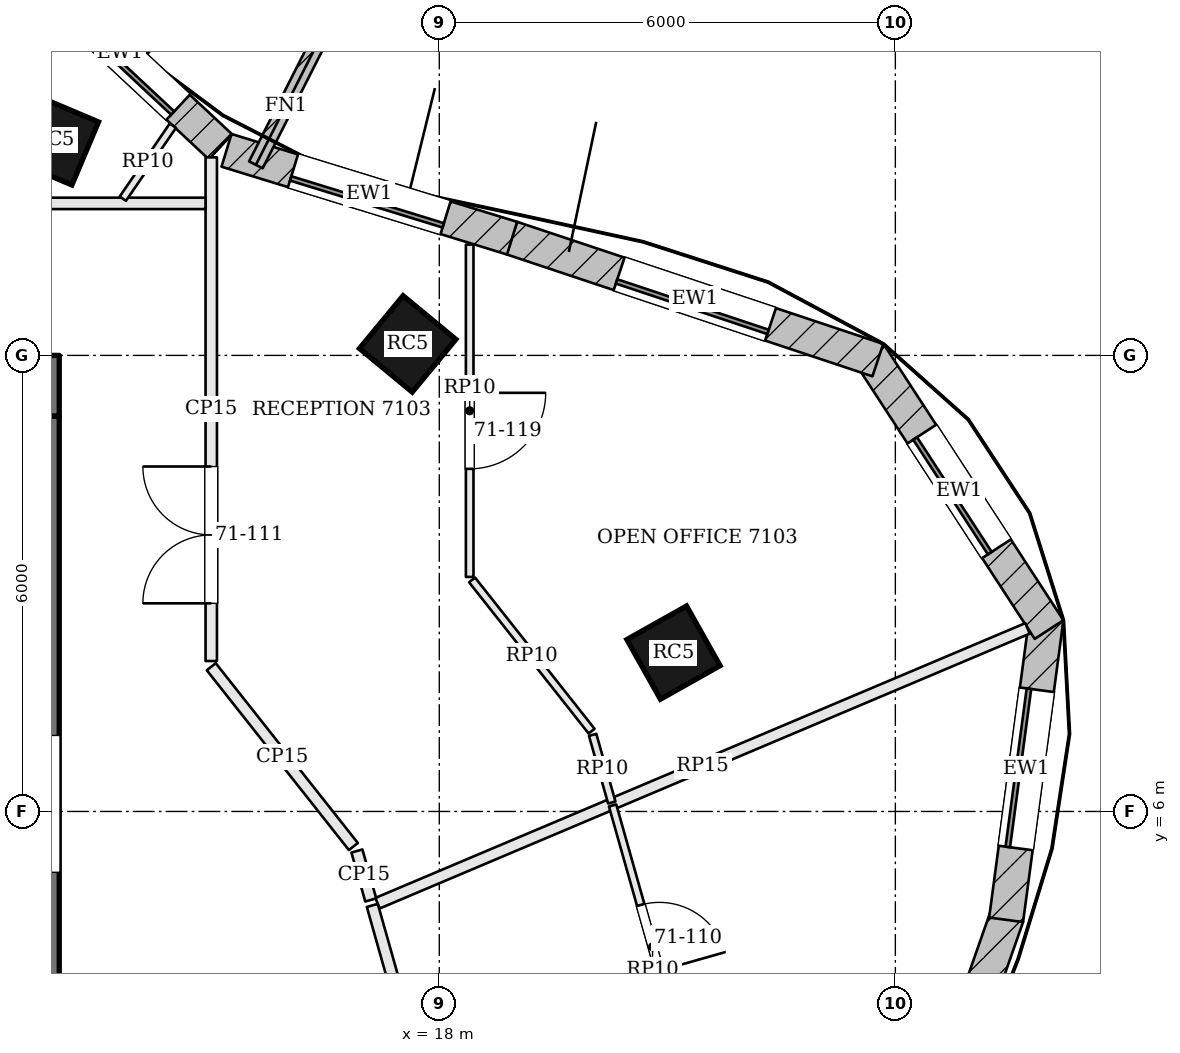
"""IFC4 building model, lengths in metres.
Left out: names, types, materials, properties, quantities, classifications, styles, units other than length and angle.
Written with IfcOpenShell. Run it as: python <this file> out.ifc"""

import sys

from ifc_helpers import new_model, si_unit, direction, frame, frame_2d, origin, origin_2d, place, context, subcontext, project, spatial, rectangle, extrude, element, fill, save


model = new_model("IFC4")
c1 = context("Model", 3, precision=1e-05, world=origin(), true_north=direction((0.0, 1.0)))
c2 = subcontext(c1, "Body", "Model", "MODEL_VIEW")
j1 = project(units=[si_unit("LENGTHUNIT", "METRE"), si_unit("PLANEANGLEUNIT", "RADIAN")], contexts=[c1])
p1 = place(None, origin())
s1 = spatial("IfcSite", under=j1, at=p1, CompositionType="ELEMENT")
p2 = place(p1, origin())
s2 = spatial("IfcBuilding", under=s1, at=p2, CompositionType="ELEMENT")
p3 = place(p2, frame((0.0, 0.0, 288.3)))
s3 = spatial("IfcBuildingStorey", under=s2, at=p3, CompositionType="ELEMENT", Elevation=288.3)
p4 = place(p3, frame((-13.0, 11.6, 0.0), z_axis=(0.0, 0.0, 1.0), x_axis=(1.0, 0.0, 0.0)))
e1 = element("IfcWall", 1, at=p4, inside=s3, PredefinedType="SHEAR", context=c2, shape_type="SweptSolid", body=[
    extrude(rectangle(XDim=26.0, YDim=0.8, at=frame_2d((13.0, 0.0))), origin(), (0.0, 0.0, 1.0), 3.9),
])
p5 = place(p4, frame((9.65, 0.0, 0.0)))
e2 = element("IfcOpeningElement", 2, at=p5, cuts=e1, PredefinedType="OPENING", context=c2, shape_type="SweptSolid", body=[
    extrude(rectangle(XDim=1.0, YDim=2.1, at=frame_2d((0.5, 1.05))), frame((0.0, 0.41, 0.0), z_axis=(0.0, -1.0, 0.0), x_axis=(1.0, 0.0, 0.0)), (0.0, 0.0, 1.0), 0.82),
])
p6 = place(p4, frame((12.675, 0.0, 0.0)))
e3 = element("IfcOpeningElement", 3, at=p6, cuts=e1, PredefinedType="OPENING", context=c2, shape_type="SweptSolid", body=[
    extrude(rectangle(XDim=0.7, YDim=2.1, at=frame_2d((0.35, 1.05))), frame((0.0, 0.41, 0.0), z_axis=(0.0, -1.0, 0.0), x_axis=(1.0, 0.0, 0.0)), (0.0, 0.0, 1.0), 0.82),
])
p7 = place(p4, frame((14.725, 0.0, 0.0)))
e4 = element("IfcOpeningElement", 4, at=p7, cuts=e1, PredefinedType="OPENING", context=c2, shape_type="SweptSolid", body=[
    extrude(rectangle(XDim=0.7, YDim=2.1, at=frame_2d((0.35, 1.05))), frame((0.0, 0.41, 0.0), z_axis=(0.0, -1.0, 0.0), x_axis=(1.0, 0.0, 0.0)), (0.0, 0.0, 1.0), 0.82),
])
p8 = place(p4, frame((16.6, 0.0, 0.0)))
e5 = element("IfcOpeningElement", 5, at=p8, cuts=e1, PredefinedType="OPENING", context=c2, shape_type="SweptSolid", body=[
    extrude(rectangle(XDim=1.0, YDim=2.1, at=frame_2d((0.5, 1.05))), frame((0.0, 0.41, 0.0), z_axis=(0.0, -1.0, 0.0), x_axis=(1.0, 0.0, 0.0)), (0.0, 0.0, 1.0), 0.82),
])
p9 = place(p3, frame((12.6, -2.2, 0.0), z_axis=(0.0, 0.0, 1.0), x_axis=(0.0, 1.0, 0.0)))
e6 = element("IfcWall", 6, at=p9, inside=s3, PredefinedType="SHEAR", context=c2, shape_type="SweptSolid", body=[
    extrude(rectangle(XDim=13.4, YDim=0.8, at=frame_2d((6.7, 0.0))), origin(), (0.0, 0.0, 1.0), 3.9),
])
p10 = place(p9, frame((7.4, 0.0, 0.0)))
e7 = element("IfcOpeningElement", 7, at=p10, cuts=e6, PredefinedType="OPENING", context=c2, shape_type="SweptSolid", body=[
    extrude(rectangle(XDim=1.8, YDim=2.1, at=frame_2d((0.9, 1.05))), frame((0.0, 0.41, 0.0), z_axis=(0.0, -1.0, 0.0), x_axis=(1.0, 0.0, 0.0)), (0.0, 0.0, 1.0), 0.82),
])
for number, where, z_axis, x_axis in (
    (8, (21.081, 8.09, 0.0), (0.0, 0.0, 1.0), (-0.49, 0.872, 0.0)),
    (9, (17.584, 12.151, 0.0), (0.0, 0.0, 1.0), (-0.771, 0.637, 0.0)),
    (10, (12.927, 14.832, 0.0), (0.0, 0.0, 1.0), (-0.921, 0.389, 0.0)),
):
    element("IfcColumn", number, at=place(p3, frame(where, z_axis=z_axis, x_axis=x_axis)), inside=s3, PredefinedType="COLUMN", context=c2, shape_type="SweptSolid", body=[
        extrude(rectangle(XDim=0.9, YDim=0.9, at=origin_2d()), origin(), (0.0, 0.0, 1.0), 3.9),
    ])
p11 = place(p3, frame((23.782, -0.189, 0.0), z_axis=(0.0, 0.0, 1.0), x_axis=(0.330794307703, 0.943702880144, 0.0)))
e11 = element("IfcWall", 11, at=p11, inside=s3, PredefinedType="SOLIDWALL", context=c2, shape_type="SweptSolid", body=[
    extrude(rectangle(XDim=5.095, YDim=0.45, at=frame_2d((2.548, 0.0))), origin(), (0.0, 0.0, 1.0), 3.7),
])
p12 = place(p11, frame((1.498, 0.0, 0.9)))
e12 = element("IfcOpeningElement", 12, at=p12, cuts=e11, PredefinedType="OPENING", context=c2, shape_type="SweptSolid", body=[
    extrude(rectangle(XDim=2.1, YDim=2.3, at=frame_2d((1.05, 1.15))), frame((0.0, 0.235, 0.0), z_axis=(0.0, -1.0, 0.0), x_axis=(1.0, 0.0, 0.0)), (0.0, 0.0, 1.0), 0.47),
])
p13 = place(p3, frame((25.457, 4.575, 0.0), z_axis=(0.0, 0.0, 1.0), x_axis=(0.132475046402, 0.991186340746, 0.0)))
e13 = element("IfcWall", 13, at=p13, inside=s3, PredefinedType="SOLIDWALL", context=c2, shape_type="SweptSolid", body=[
    extrude(rectangle(XDim=4.007, YDim=0.45, at=frame_2d((2.003, 0.0))), origin(), (0.0, 0.0, 1.0), 3.7),
])
p14 = place(p13, frame((0.953, 0.0, 0.9)))
e14 = element("IfcOpeningElement", 14, at=p14, cuts=e13, PredefinedType="OPENING", context=c2, shape_type="SweptSolid", body=[
    extrude(rectangle(XDim=2.1, YDim=2.3, at=frame_2d((1.05, 1.15))), frame((0.0, 0.235, 0.0), z_axis=(0.0, -1.0, 0.0), x_axis=(1.0, 0.0, 0.0)), (0.0, 0.0, 1.0), 0.47),
])
p15 = place(p3, frame((26.022, 8.393, 0.0), z_axis=(0.0, 0.0, 1.0), x_axis=(-0.545637310328, 0.838021435035, 0.0)))
e15 = element("IfcWall", 15, at=p15, inside=s3, PredefinedType="SOLIDWALL", context=c2, shape_type="SweptSolid", body=[
    extrude(rectangle(XDim=4.336, YDim=0.45, at=frame_2d((2.168, 0.0))), origin(), (0.0, 0.0, 1.0), 3.7),
])
p16 = place(p15, frame((1.268, 0.0, 0.9)))
e16 = element("IfcOpeningElement", 16, at=p16, cuts=e15, PredefinedType="OPENING", context=c2, shape_type="SweptSolid", body=[
    extrude(rectangle(XDim=1.8, YDim=2.3, at=frame_2d((0.9, 1.15))), frame((0.0, 0.235, 0.0), z_axis=(0.0, -1.0, 0.0), x_axis=(1.0, 0.0, 0.0)), (0.0, 0.0, 1.0), 0.47),
])
p17 = place(p3, frame((23.77, 11.938, 0.0), z_axis=(0.0, 0.0, 1.0), x_axis=(-0.948673679101, 0.316256621402, 0.0)))
e17 = element("IfcWall", 17, at=p17, inside=s3, PredefinedType="SOLIDWALL", context=c2, shape_type="SweptSolid", body=[
    extrude(rectangle(XDim=5.076, YDim=0.45, at=frame_2d((2.538, 0.0))), origin(), (0.0, 0.0, 1.0), 3.7),
])
p18 = place(p17, frame((1.488, 0.0, 0.9)))
e18 = element("IfcOpeningElement", 18, at=p18, cuts=e17, PredefinedType="OPENING", context=c2, shape_type="SweptSolid", body=[
    extrude(rectangle(XDim=2.1, YDim=2.3, at=frame_2d((1.05, 1.15))), frame((0.0, 0.235, 0.0), z_axis=(0.0, -1.0, 0.0), x_axis=(1.0, 0.0, 0.0)), (0.0, 0.0, 1.0), 0.47),
])
p19 = place(p3, frame((18.958, 13.542, 0.0), z_axis=(0.0, 0.0, 1.0), x_axis=(-0.955792437529, 0.294042201668, 0.0)))
e19 = element("IfcWall", 19, at=p19, inside=s3, PredefinedType="SOLIDWALL", context=c2, shape_type="SweptSolid", body=[
    extrude(rectangle(XDim=3.931, YDim=0.45, at=frame_2d((1.965, 0.0))), origin(), (0.0, 0.0, 1.0), 3.7),
])
p20 = place(p19, frame((0.915, 0.0, 0.9)))
e20 = element("IfcOpeningElement", 20, at=p20, cuts=e19, PredefinedType="OPENING", context=c2, shape_type="SweptSolid", body=[
    extrude(rectangle(XDim=2.1, YDim=2.3, at=frame_2d((1.05, 1.15))), frame((0.0, 0.235, 0.0), z_axis=(0.0, -1.0, 0.0), x_axis=(1.0, 0.0, 0.0)), (0.0, 0.0, 1.0), 0.47),
])
p21 = place(p3, frame((15.121, 14.745, 0.0), z_axis=(0.0, 0.0, 1.0), x_axis=(-0.730618259172, 0.68278617397, 0.0)))
e21 = element("IfcWall", 21, at=p21, inside=s3, PredefinedType="SOLIDWALL", context=c2, shape_type="SweptSolid", body=[
    extrude(rectangle(XDim=3.624, YDim=0.45, at=frame_2d((1.812, 0.0))), origin(), (0.0, 0.0, 1.0), 3.7),
])
p22 = place(p21, frame((0.762, 0.0, 0.9)))
e22 = element("IfcOpeningElement", 22, at=p22, cuts=e21, PredefinedType="OPENING", context=c2, shape_type="SweptSolid", body=[
    extrude(rectangle(XDim=2.1, YDim=2.3, at=frame_2d((1.05, 1.15))), frame((0.0, 0.235, 0.0), z_axis=(0.0, -1.0, 0.0), x_axis=(1.0, 0.0, 0.0)), (0.0, 0.0, 1.0), 0.47),
])
p23 = place(p3, frame((15.587, 14.507, 0.0), z_axis=(0.0, 0.0, 1.0), x_axis=(0.452117231361, 0.89195852432, 0.0)))
e23 = element("IfcWall", 23, at=p23, inside=s3, PredefinedType="SOLIDWALL", context=c2, shape_type="SweptSolid", body=[
    extrude(rectangle(XDim=1.75, YDim=0.2, at=frame_2d((0.875, 0.0))), origin(), (0.0, 0.0, 1.0), 3.7),
])
p24 = place(p3, frame((17.9, 2.0, 0.0), z_axis=(0.0, 0.0, 1.0), x_axis=(-0.271980959701, 0.962302633042, 0.0)))
e24 = element("IfcWall", 24, at=p24, inside=s3, PredefinedType="PARTITIONING", context=c2, shape_type="SweptSolid", body=[
    extrude(rectangle(XDim=2.873, YDim=0.15, at=frame_2d((1.436, 0.0))), origin(), (0.0, 0.0, 1.0), 3.198),
])
p25 = place(p3, frame((25.739, 8.408, 0.0), z_axis=(0.0, 0.0, 1.0), x_axis=(-0.92106014218, -0.389420357052, 0.0)))
e25 = element("IfcWall", 25, at=p25, inside=s3, PredefinedType="PARTITIONING", context=c2, shape_type="SweptSolid", body=[
    extrude(rectangle(XDim=9.284, YDim=0.15, at=frame_2d((4.642, 0.0))), origin(), (0.0, 0.0, 1.0), 3.234),
])
p26 = place(p3, frame((17.098, 4.836, 0.0), z_axis=(0.0, 0.0, 1.0), x_axis=(-0.271971703561, 0.962305249109, 0.0)))
e26 = element("IfcWall", 26, at=p26, inside=s3, PredefinedType="PARTITIONING", context=c2, shape_type="SweptSolid", body=[
    extrude(rectangle(XDim=0.669, YDim=0.15, at=frame_2d((0.334, 0.0))), origin(), (0.0, 0.0, 1.0), 3.198),
])
p27 = place(p3, frame((16.87, 5.539, 0.0), z_axis=(0.0, 0.0, 1.0), x_axis=(-0.620093074114, 0.784528252796, 0.0)))
e27 = element("IfcWall", 27, at=p27, inside=s3, PredefinedType="PARTITIONING", context=c2, shape_type="SweptSolid", body=[
    extrude(rectangle(XDim=3.015, YDim=0.15, at=frame_2d((1.508, 0.0))), origin(), (0.0, 0.0, 1.0), 3.198),
])
p28 = place(p3, frame((15.0, 7.979, 0.0), z_axis=(0.0, 0.0, 1.0), x_axis=(0.0, 1.0, 0.0)))
e28 = element("IfcWall", 28, at=p28, inside=s3, PredefinedType="PARTITIONING", context=c2, shape_type="SweptSolid", body=[
    extrude(rectangle(XDim=6.626, YDim=0.15, at=frame_2d((3.313, 0.0))), origin(), (0.0, 0.0, 1.0), 3.198),
])
p29 = place(p28, frame((0.759, 0.0, 0.0)))
e29 = element("IfcOpeningElement", 29, at=p29, cuts=e28, PredefinedType="OPENING", context=c2, shape_type="SweptSolid", body=[
    extrude(rectangle(XDim=1.8, YDim=2.1, at=frame_2d((0.9, 1.05))), frame((0.0, 0.085, 0.0), z_axis=(0.0, -1.0, 0.0), x_axis=(1.0, 0.0, 0.0)), (0.0, 0.0, 1.0), 0.17),
])
p30 = place(p3, frame((14.925, 14.0, 0.0), z_axis=(0.0, 0.0, 1.0), x_axis=(-1.0, 0.0, 0.0)))
e30 = element("IfcWall", 30, at=p30, inside=s3, PredefinedType="PARTITIONING", context=c2, shape_type="SweptSolid", body=[
    extrude(rectangle(XDim=11.827, YDim=0.15, at=frame_2d((5.914, 0.0))), origin(), (0.0, 0.0, 1.0), 3.198),
])
p31 = place(p30, frame((3.25, 0.0, 0.0)))
e31 = element("IfcOpeningElement", 31, at=p31, cuts=e30, PredefinedType="OPENING", context=c2, shape_type="SweptSolid", body=[
    extrude(rectangle(XDim=1.0, YDim=2.1, at=frame_2d((0.5, 1.05))), frame((0.0, 0.085, 0.0), z_axis=(0.0, -1.0, 0.0), x_axis=(1.0, 0.0, 0.0)), (0.0, 0.0, 1.0), 0.17),
])
p32 = place(p30, frame((8.55, 0.0, 0.0)))
e32 = element("IfcOpeningElement", 32, at=p32, cuts=e30, PredefinedType="OPENING", context=c2, shape_type="SweptSolid", body=[
    extrude(rectangle(XDim=1.0, YDim=2.1, at=frame_2d((0.5, 1.05))), frame((0.0, 0.085, 0.0), z_axis=(0.0, -1.0, 0.0), x_axis=(1.0, 0.0, 0.0)), (0.0, 0.0, 1.0), 0.17),
])
p33 = place(p3, frame((20.28, 6.079, 0.0), z_axis=(0.0, 0.0, 1.0), x_axis=(0.271974810721, -0.962304370942, 0.0)))
e33 = element("IfcWall", 33, at=p33, inside=s3, PredefinedType="PARTITIONING", context=c2, shape_type="SweptSolid", body=[
    extrude(rectangle(XDim=3.865, YDim=0.1, at=frame_2d((1.932, 0.0))), origin(), (0.0, 0.0, 1.0), 3.198),
])
p34 = place(p33, frame((1.36, 0.0, 0.0)))
e34 = element("IfcOpeningElement", 34, at=p34, cuts=e33, PredefinedType="OPENING", context=c2, shape_type="SweptSolid", body=[
    extrude(rectangle(XDim=0.9, YDim=2.1, at=frame_2d((0.45, 1.05))), frame((0.0, 0.06, 0.0), z_axis=(0.0, -1.0, 0.0), x_axis=(1.0, 0.0, 0.0)), (0.0, 0.0, 1.0), 0.12),
])
p35 = place(p3, frame((18.4, 13.458, 0.0), z_axis=(0.0, 0.0, 1.0), x_axis=(0.0, -1.0, 0.0)))
e35 = element("IfcWall", 35, at=p35, inside=s3, PredefinedType="PARTITIONING", context=c2, shape_type="SweptSolid", body=[
    extrude(rectangle(XDim=4.372, YDim=0.1, at=frame_2d((2.186, 0.0))), origin(), (0.0, 0.0, 1.0), 3.198),
])
p36 = place(p35, frame((1.95, 0.0, 0.0)))
e36 = element("IfcOpeningElement", 36, at=p36, cuts=e35, PredefinedType="OPENING", context=c2, shape_type="SweptSolid", body=[
    extrude(rectangle(XDim=1.0, YDim=2.1, at=frame_2d((0.5, 1.05))), frame((0.0, 0.06, 0.0), z_axis=(0.0, -1.0, 0.0), x_axis=(1.0, 0.0, 0.0)), (0.0, 0.0, 1.0), 0.12),
])
p37 = place(p3, frame((18.431, 9.046, 0.0), z_axis=(0.0, 0.0, 1.0), x_axis=(0.620118511479, -0.78450814637, 0.0)))
e37 = element("IfcWall", 37, at=p37, inside=s3, PredefinedType="PARTITIONING", context=c2, shape_type="SweptSolid", body=[
    extrude(rectangle(XDim=2.537, YDim=0.1, at=frame_2d((1.268, 0.0))), origin(), (0.0, 0.0, 1.0), 3.198),
])
p38 = place(p3, frame((20.018, 7.008, 0.0), z_axis=(0.0, 0.0, 1.0), x_axis=(0.272036681058, -0.962286882462, 0.0)))
e38 = element("IfcWall", 38, at=p38, inside=s3, PredefinedType="PARTITIONING", context=c2, shape_type="SweptSolid", body=[
    extrude(rectangle(XDim=0.925, YDim=0.1, at=frame_2d((0.463, 0.0))), origin(), (0.0, 0.0, 1.0), 3.198),
])
p39 = place(p3, frame((13.837, 14.062, 0.0), z_axis=(0.0, 0.0, 1.0), x_axis=(0.565495744886, 0.824751212497, 0.0)))
e39 = element("IfcWall", 39, at=p39, inside=s3, PredefinedType="PARTITIONING", context=c2, shape_type="SweptSolid", body=[
    extrude(rectangle(XDim=1.164, YDim=0.1, at=frame_2d((0.582, 0.0))), origin(), (0.0, 0.0, 1.0), 3.198),
])
p40 = place(p14, origin())
e40 = element("IfcWindow", 40, at=p40, inside=s3, PartitioningType="SINGLE_PANEL", PredefinedType="WINDOW", context=c2, shape_type="SweptSolid", body=[
    extrude(rectangle(XDim=2.1, YDim=2.3, at=frame_2d((1.05, 1.15))), frame((0.0, 0.135, 0.0), z_axis=(0.0, -1.0, 0.0), x_axis=(1.0, 0.0, 0.0)), (0.0, 0.0, 1.0), 0.06),
])
fill(e14, e40)
p41 = place(p16, origin())
e41 = element("IfcWindow", 41, at=p41, inside=s3, PartitioningType="SINGLE_PANEL", PredefinedType="WINDOW", context=c2, shape_type="SweptSolid", body=[
    extrude(rectangle(XDim=1.8, YDim=2.3, at=frame_2d((0.9, 1.15))), frame((0.0, 0.135, 0.0), z_axis=(0.0, -1.0, 0.0), x_axis=(1.0, 0.0, 0.0)), (0.0, 0.0, 1.0), 0.06),
])
fill(e16, e41)
p42 = place(p18, origin())
e42 = element("IfcWindow", 42, at=p42, inside=s3, PartitioningType="SINGLE_PANEL", PredefinedType="WINDOW", context=c2, shape_type="SweptSolid", body=[
    extrude(rectangle(XDim=2.1, YDim=2.3, at=frame_2d((1.05, 1.15))), frame((0.0, 0.135, 0.0), z_axis=(0.0, -1.0, 0.0), x_axis=(1.0, 0.0, 0.0)), (0.0, 0.0, 1.0), 0.06),
])
fill(e18, e42)
p43 = place(p20, origin())
e43 = element("IfcWindow", 43, at=p43, inside=s3, PartitioningType="SINGLE_PANEL", PredefinedType="WINDOW", context=c2, shape_type="SweptSolid", body=[
    extrude(rectangle(XDim=2.1, YDim=2.3, at=frame_2d((1.05, 1.15))), frame((0.0, 0.135, 0.0), z_axis=(0.0, -1.0, 0.0), x_axis=(1.0, 0.0, 0.0)), (0.0, 0.0, 1.0), 0.06),
])
fill(e20, e43)
p44 = place(p22, origin())
e44 = element("IfcWindow", 44, at=p44, inside=s3, PartitioningType="SINGLE_PANEL", PredefinedType="WINDOW", context=c2, shape_type="SweptSolid", body=[
    extrude(rectangle(XDim=2.1, YDim=2.3, at=frame_2d((1.05, 1.15))), frame((0.0, 0.135, 0.0), z_axis=(0.0, -1.0, 0.0), x_axis=(1.0, 0.0, 0.0)), (0.0, 0.0, 1.0), 0.06),
])
fill(e22, e44)
p45 = place(p34, origin())
e45 = element("IfcDoor", 45, at=p45, inside=s3, OperationType="SINGLE_SWING_RIGHT", PredefinedType="DOOR", context=c2, shape_type="SweptSolid", body=[
    extrude(rectangle(XDim=0.9, YDim=2.1, at=frame_2d((0.45, 1.05))), frame((0.0, 0.025, 0.0), z_axis=(0.0, -1.0, 0.0), x_axis=(1.0, 0.0, 0.0)), (0.0, 0.0, 1.0), 0.05),
])
fill(e34, e45)
p46 = place(p29, origin())
e46 = element("IfcDoor", 46, at=p46, inside=s3, OperationType="DOUBLE_DOOR_SINGLE_SWING", PredefinedType="DOOR", context=c2, shape_type="SweptSolid", body=[
    extrude(rectangle(XDim=1.8, YDim=2.1, at=frame_2d((0.9, 1.05))), frame((0.0, 0.025, 0.0), z_axis=(0.0, -1.0, 0.0), x_axis=(1.0, 0.0, 0.0)), (0.0, 0.0, 1.0), 0.05),
])
fill(e29, e46)
p47 = place(p36, origin())
e47 = element("IfcDoor", 47, at=p47, inside=s3, OperationType="SINGLE_SWING_LEFT", PredefinedType="DOOR", context=c2, shape_type="SweptSolid", body=[
    extrude(rectangle(XDim=1.0, YDim=2.1, at=frame_2d((0.5, 1.05))), frame((0.0, 0.025, 0.0), z_axis=(0.0, -1.0, 0.0), x_axis=(1.0, 0.0, 0.0)), (0.0, 0.0, 1.0), 0.05),
])
fill(e36, e47)
save(model, sys.argv[1])
